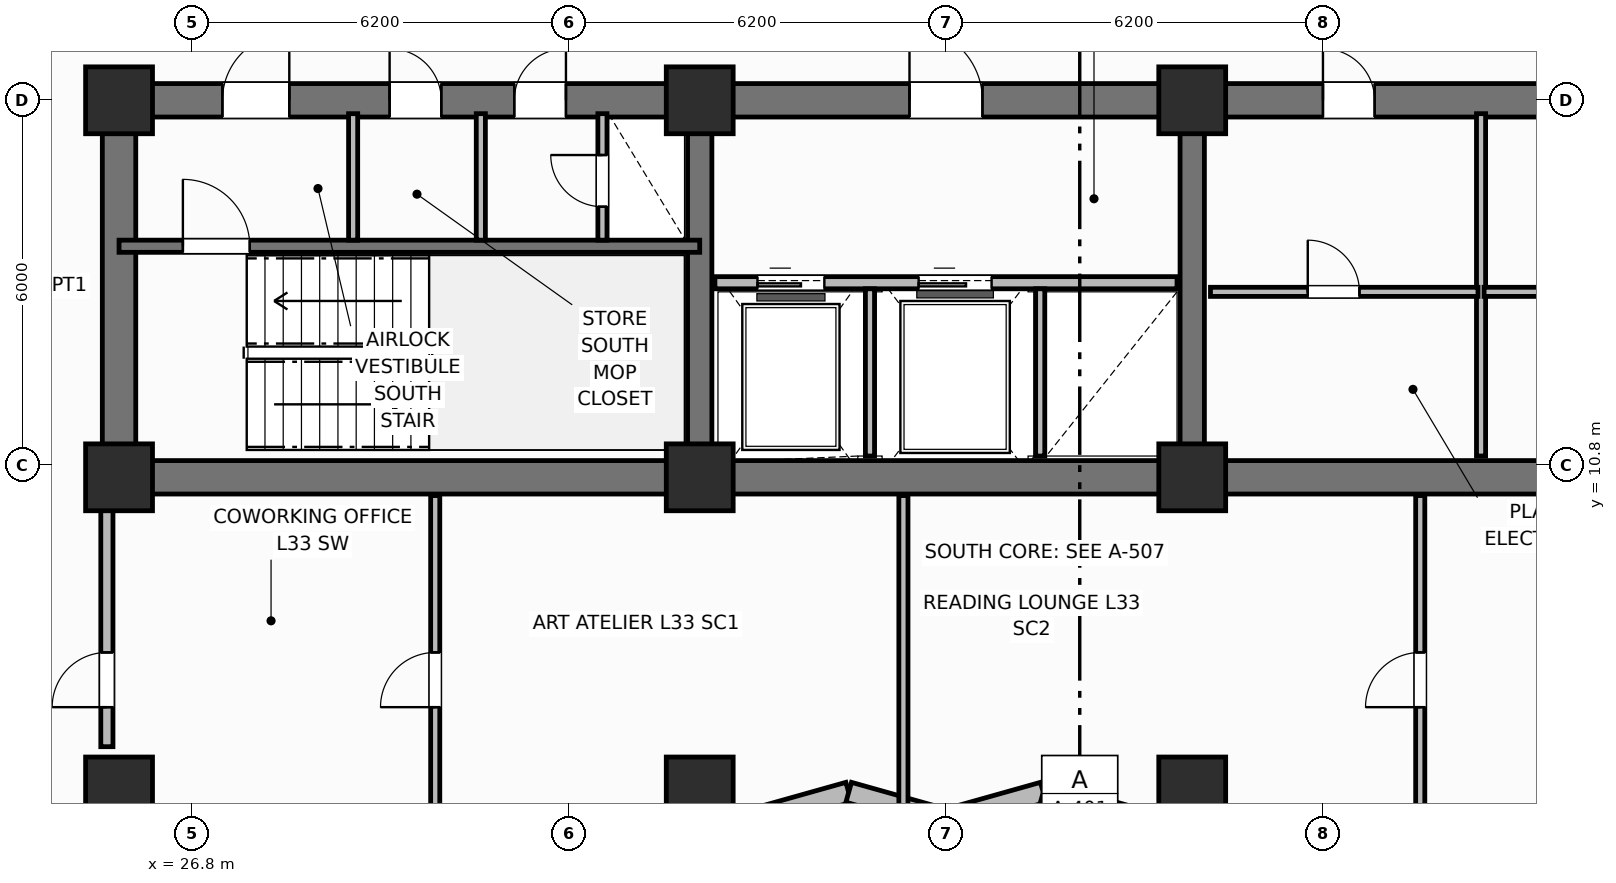
"""IFC4 building model, lengths in metres.
Left out: names, types, materials, properties, quantities, classifications, styles, units other than length and angle.
Written with IfcOpenShell. Run it as: python <this file> out.ifc"""

import sys

from ifc_helpers import new_model, si_unit, direction, frame, frame_2d, origin, origin_2d, place, context, subcontext, project, spatial, rectangle, extrude, element, fill, save


model = new_model("IFC4")
c1 = context("Model", 3, precision=1e-05, world=origin(), true_north=direction((0.0, 1.0)))
c2 = subcontext(c1, "Body", "Model", "MODEL_VIEW")
j1 = project(units=[si_unit("LENGTHUNIT", "METRE"), si_unit("PLANEANGLEUNIT", "RADIAN")], contexts=[c1])
p1 = place(None, origin())
s1 = spatial("IfcSite", under=j1, at=p1, CompositionType="ELEMENT")
p2 = place(p1, origin())
s2 = spatial("IfcBuilding", under=s1, at=p2, CompositionType="ELEMENT")
p3 = place(p2, frame((0.0, 0.0, 132.7)))
s3 = spatial("IfcBuildingStorey", under=s2, at=p3, CompositionType="ELEMENT", Elevation=132.7)
p4 = place(p3, frame((52.8, 10.6, 0.0), z_axis=(0.0, 0.0, 1.0), x_axis=(-1.0, 0.0, 0.0)))
e1 = element("IfcWall", 1, at=p4, inside=s3, PredefinedType="SHEAR", context=c2, shape_type="SweptSolid", body=[
    extrude(rectangle(XDim=27.2, YDim=0.55, at=frame_2d((13.6, 0.0))), origin(), (0.0, 0.0, 1.0), 3.7),
])
p5 = place(p3, frame((25.6, 10.875, 0.0), z_axis=(0.0, 0.0, 1.0), x_axis=(0.0, 1.0, 0.0)))
e2 = element("IfcWall", 2, at=p5, inside=s3, PredefinedType="SHEAR", context=c2, shape_type="SweptSolid", body=[
    extrude(rectangle(XDim=5.65, YDim=0.55, at=frame_2d((2.825, 0.0))), origin(), (0.0, 0.0, 1.0), 3.7),
])
p6 = place(p3, frame((25.6, 16.8, 0.0), z_axis=(0.0, 0.0, 1.0), x_axis=(1.0, 0.0, 0.0)))
e3 = element("IfcWall", 3, at=p6, inside=s3, PredefinedType="SHEAR", context=c2, shape_type="SweptSolid", body=[
    extrude(rectangle(XDim=27.2, YDim=0.55, at=frame_2d((13.6, 0.0))), origin(), (0.0, 0.0, 1.0), 3.7),
])
p7 = place(p6, frame((1.7, 0.0, 0.0)))
e4 = element("IfcOpeningElement", 4, at=p7, cuts=e3, PredefinedType="OPENING", context=c2, shape_type="SweptSolid", body=[
    extrude(rectangle(XDim=1.1, YDim=2.15, at=frame_2d((0.55, 1.075))), frame((0.0, 0.285, 0.0), z_axis=(0.0, -1.0, 0.0), x_axis=(1.0, 0.0, 0.0)), (0.0, 0.0, 1.0), 0.57),
])
p8 = place(p6, frame((4.45, 0.0, 0.0)))
e5 = element("IfcOpeningElement", 5, at=p8, cuts=e3, PredefinedType="OPENING", context=c2, shape_type="SweptSolid", body=[
    extrude(rectangle(XDim=0.85, YDim=2.1, at=frame_2d((0.425, 1.05))), frame((0.0, 0.285, 0.0), z_axis=(0.0, -1.0, 0.0), x_axis=(1.0, 0.0, 0.0)), (0.0, 0.0, 1.0), 0.57),
])
p9 = place(p6, frame((6.5, 0.0, 0.0)))
e6 = element("IfcOpeningElement", 6, at=p9, cuts=e3, PredefinedType="OPENING", context=c2, shape_type="SweptSolid", body=[
    extrude(rectangle(XDim=0.85, YDim=2.1, at=frame_2d((0.425, 1.05))), frame((0.0, 0.285, 0.0), z_axis=(0.0, -1.0, 0.0), x_axis=(1.0, 0.0, 0.0)), (0.0, 0.0, 1.0), 0.57),
])
p10 = place(p6, frame((13.0, 0.0, 0.0)))
e7 = element("IfcOpeningElement", 7, at=p10, cuts=e3, PredefinedType="OPENING", context=c2, shape_type="SweptSolid", body=[
    extrude(rectangle(XDim=1.2, YDim=2.15, at=frame_2d((0.6, 1.075))), frame((0.0, 0.285, 0.0), z_axis=(0.0, -1.0, 0.0), x_axis=(1.0, 0.0, 0.0)), (0.0, 0.0, 1.0), 0.57),
])
p11 = place(p6, frame((19.8, 0.0, 0.0)))
e8 = element("IfcOpeningElement", 8, at=p11, cuts=e3, PredefinedType="OPENING", context=c2, shape_type="SweptSolid", body=[
    extrude(rectangle(XDim=0.85, YDim=2.1, at=frame_2d((0.425, 1.05))), frame((0.0, 0.285, 0.0), z_axis=(0.0, -1.0, 0.0), x_axis=(1.0, 0.0, 0.0)), (0.0, 0.0, 1.0), 0.57),
])
p12 = place(p6, frame((24.2, 0.0, 0.0)))
e9 = element("IfcOpeningElement", 9, at=p12, cuts=e3, PredefinedType="OPENING", context=c2, shape_type="SweptSolid", body=[
    extrude(rectangle(XDim=0.85, YDim=2.1, at=frame_2d((0.425, 1.05))), frame((0.0, 0.285, 0.0), z_axis=(0.0, -1.0, 0.0), x_axis=(1.0, 0.0, 0.0)), (0.0, 0.0, 1.0), 0.57),
])
for number, where, z_axis, x_axis in (
    (10, (35.15, 10.875, 0.0), (0.0, 0.0, 1.0), (0.0, 1.0, 0.0)),
    (11, (43.25, 10.875, 0.0), (0.0, 0.0, 1.0), (0.0, 1.0, 0.0)),
):
    element("IfcWall", number, at=place(p3, frame(where, z_axis=z_axis, x_axis=x_axis)), inside=s3, PredefinedType="SHEAR", context=c2, shape_type="SweptSolid", body=[
        extrude(rectangle(XDim=5.65, YDim=0.4, at=frame_2d((2.825, 0.0))), origin(), (0.0, 0.0, 1.0), 3.7),
    ])
for number, where, z_axis, x_axis in (
    (12, (25.6, 10.6, 0.0), (0.0, 0.0, 1.0), (1.0, 0.0, 0.0)),
    (13, (25.6, 16.8, 0.0), (0.0, 0.0, 1.0), (1.0, 0.0, 0.0)),
    (14, (35.15, 10.6, 0.0), (0.0, 0.0, 1.0), (1.0, 0.0, 0.0)),
    (15, (35.15, 16.8, 0.0), (0.0, 0.0, 1.0), (1.0, 0.0, 0.0)),
    (16, (43.25, 10.6, 0.0), (0.0, 0.0, 1.0), (1.0, 0.0, 0.0)),
    (17, (43.25, 16.8, 0.0), (0.0, 0.0, 1.0), (1.0, 0.0, 0.0)),
    (18, (25.6, 5.45, 0.0), (0.0, 0.0, 1.0), (1.0, 0.0, 0.0)),
    (19, (35.15, 5.45, 0.0), (0.0, 0.0, 1.0), (1.0, 0.0, 0.0)),
    (20, (43.25, 5.45, 0.0), (0.0, 0.0, 1.0), (1.0, 0.0, 0.0)),
):
    element("IfcColumn", number, at=place(p3, frame(where, z_axis=z_axis, x_axis=x_axis)), inside=s3, PredefinedType="COLUMN", context=c2, shape_type="SweptSolid", body=[
        extrude(rectangle(XDim=1.1, YDim=1.1, at=origin_2d()), origin(), (0.0, 0.0, 1.0), 3.7),
    ])
p13 = place(p3, frame((36.0, 4.97, 0.0), z_axis=(0.0, 0.0, 1.0), x_axis=(0.962662902433, 0.270703040766, 0.0)))
e21 = element("IfcWall", 21, at=p13, inside=s3, PredefinedType="SOLIDWALL", context=c2, shape_type="SweptSolid", body=[
    extrude(rectangle(XDim=1.662, YDim=0.34, at=frame_2d((0.831, 0.0))), origin(), (0.0, 0.0, 1.0), 2.66),
])
p14 = place(p3, frame((37.6, 5.42, 0.0), z_axis=(0.0, 0.0, 1.0), x_axis=(0.962652136636, -0.270741322725, 0.0)))
e22 = element("IfcWall", 22, at=p14, inside=s3, PredefinedType="SOLIDWALL", context=c2, shape_type="SweptSolid", body=[
    extrude(rectangle(XDim=1.662, YDim=0.34, at=frame_2d((0.831, 0.0))), origin(), (0.0, 0.0, 1.0), 2.66),
])
p15 = place(p3, frame((39.2, 4.97, 0.0), z_axis=(0.0, 0.0, 1.0), x_axis=(0.962662902433, 0.270703040766, 0.0)))
e23 = element("IfcWall", 23, at=p15, inside=s3, PredefinedType="SOLIDWALL", context=c2, shape_type="SweptSolid", body=[
    extrude(rectangle(XDim=1.662, YDim=0.34, at=frame_2d((0.831, 0.0))), origin(), (0.0, 0.0, 1.0), 2.66),
])
p16 = place(p3, frame((40.8, 5.42, 0.0), z_axis=(0.0, 0.0, 1.0), x_axis=(0.962652136636, -0.270741322725, 0.0)))
e24 = element("IfcWall", 24, at=p16, inside=s3, PredefinedType="SOLIDWALL", context=c2, shape_type="SweptSolid", body=[
    extrude(rectangle(XDim=1.662, YDim=0.34, at=frame_2d((0.831, 0.0))), origin(), (0.0, 0.0, 1.0), 2.66),
])
p17 = place(p3, frame((25.6, 14.4, 0.0), z_axis=(0.0, 0.0, 1.0), x_axis=(1.0, 0.0, 0.0)))
e25 = element("IfcWall", 25, at=p17, inside=s3, PredefinedType="SHEAR", context=c2, shape_type="SweptSolid", body=[
    extrude(rectangle(XDim=9.55, YDim=0.2, at=frame_2d((4.775, 0.0))), origin(), (0.0, 0.0, 1.0), 3.7),
])
p18 = place(p17, frame((1.05, 0.0, 0.0)))
e26 = element("IfcOpeningElement", 26, at=p18, cuts=e25, PredefinedType="OPENING", context=c2, shape_type="SweptSolid", body=[
    extrude(rectangle(XDim=1.1, YDim=2.15, at=frame_2d((0.55, 1.075))), frame((0.0, 0.11, 0.0), z_axis=(0.0, -1.0, 0.0), x_axis=(1.0, 0.0, 0.0)), (0.0, 0.0, 1.0), 0.22),
])
for number, where, z_axis, x_axis in (
    (27, (29.45, 14.5, 0.0), (0.0, 0.0, 1.0), (0.0, 1.0, 0.0)),
    (28, (31.55, 14.5, 0.0), (0.0, 0.0, 1.0), (0.0, 1.0, 0.0)),
):
    element("IfcWall", number, at=place(p3, frame(where, z_axis=z_axis, x_axis=x_axis)), inside=s3, PredefinedType="PARTITIONING", context=c2, shape_type="SweptSolid", body=[
        extrude(rectangle(XDim=2.08, YDim=0.15, at=frame_2d((1.04, 0.0))), origin(), (0.0, 0.0, 1.0), 2.49),
    ])
p19 = place(p3, frame((33.55, 14.5, 0.0), z_axis=(0.0, 0.0, 1.0), x_axis=(0.0, 1.0, 0.0)))
e29 = element("IfcWall", 29, at=p19, inside=s3, PredefinedType="PARTITIONING", context=c2, shape_type="SweptSolid", body=[
    extrude(rectangle(XDim=2.08, YDim=0.15, at=frame_2d((1.04, 0.0))), origin(), (0.0, 0.0, 1.0), 2.49),
])
p20 = place(p19, frame((0.55, 0.0, 0.0)))
e30 = element("IfcOpeningElement", 30, at=p20, cuts=e29, PredefinedType="OPENING", context=c2, shape_type="SweptSolid", body=[
    extrude(rectangle(XDim=0.85, YDim=2.05, at=frame_2d((0.425, 1.025))), frame((0.0, 0.085, 0.0), z_axis=(0.0, -1.0, 0.0), x_axis=(1.0, 0.0, 0.0)), (0.0, 0.0, 1.0), 0.17),
])
p21 = place(p3, frame((35.4, 13.8, 0.0), z_axis=(0.0, 0.0, 1.0), x_axis=(1.0, 0.0, 0.0)))
e31 = element("IfcWall", 31, at=p21, inside=s3, PredefinedType="PARTITIONING", context=c2, shape_type="SweptSolid", body=[
    extrude(rectangle(XDim=7.6, YDim=0.2, at=frame_2d((3.8, 0.0))), origin(), (0.0, 0.0, 1.0), 2.26),
])
p22 = place(p21, frame((0.7, 0.0, 0.0)))
e32 = element("IfcOpeningElement", 32, at=p22, cuts=e31, PredefinedType="OPENING", context=c2, shape_type="SweptSolid", body=[
    extrude(rectangle(XDim=1.1, YDim=2.15, at=frame_2d((0.55, 1.075))), frame((0.0, 0.11, 0.0), z_axis=(0.0, -1.0, 0.0), x_axis=(1.0, 0.0, 0.0)), (0.0, 0.0, 1.0), 0.22),
])
p23 = place(p21, frame((3.35, 0.0, 0.0)))
e33 = element("IfcOpeningElement", 33, at=p23, cuts=e31, PredefinedType="OPENING", context=c2, shape_type="SweptSolid", body=[
    extrude(rectangle(XDim=1.2, YDim=2.15, at=frame_2d((0.6, 1.075))), frame((0.0, 0.11, 0.0), z_axis=(0.0, -1.0, 0.0), x_axis=(1.0, 0.0, 0.0)), (0.0, 0.0, 1.0), 0.22),
])
for number, where, z_axis, x_axis in (
    (34, (37.95, 10.95, 0.0), (0.0, 0.0, 1.0), (0.0, 1.0, 0.0)),
    (35, (40.75, 10.95, 0.0), (0.0, 0.0, 1.0), (0.0, 1.0, 0.0)),
):
    element("IfcWall", number, at=place(p3, frame(where, z_axis=z_axis, x_axis=x_axis)), inside=s3, PredefinedType="PARTITIONING", context=c2, shape_type="SweptSolid", body=[
        extrude(rectangle(XDim=2.75, YDim=0.15, at=frame_2d((1.375, 0.0))), origin(), (0.0, 0.0, 1.0), 2.49),
    ])
p24 = place(p3, frame((48.0, 10.95, 0.0), z_axis=(0.0, 0.0, 1.0), x_axis=(0.0, 1.0, 0.0)))
e36 = element("IfcWall", 36, at=p24, inside=s3, PredefinedType="PARTITIONING", context=c2, shape_type="SweptSolid", body=[
    extrude(rectangle(XDim=5.63, YDim=0.15, at=frame_2d((2.815, 0.0))), origin(), (0.0, 0.0, 1.0), 2.49),
])
p25 = place(p3, frame((43.55, 13.65, 0.0), z_axis=(0.0, 0.0, 1.0), x_axis=(1.0, 0.0, 0.0)))
e37 = element("IfcWall", 37, at=p25, inside=s3, PredefinedType="PARTITIONING", context=c2, shape_type="SweptSolid", body=[
    extrude(rectangle(XDim=4.4, YDim=0.15, at=frame_2d((2.2, 0.0))), origin(), (0.0, 0.0, 1.0), 2.49),
])
p26 = place(p25, frame((1.6, 0.0, 0.0)))
e38 = element("IfcOpeningElement", 38, at=p26, cuts=e37, PredefinedType="OPENING", context=c2, shape_type="SweptSolid", body=[
    extrude(rectangle(XDim=0.85, YDim=2.1, at=frame_2d((0.425, 1.05))), frame((0.0, 0.085, 0.0), z_axis=(0.0, -1.0, 0.0), x_axis=(1.0, 0.0, 0.0)), (0.0, 0.0, 1.0), 0.17),
])
p27 = place(p3, frame((48.05, 13.65, 0.0), z_axis=(0.0, 0.0, 1.0), x_axis=(1.0, 0.0, 0.0)))
e39 = element("IfcWall", 39, at=p27, inside=s3, PredefinedType="PARTITIONING", context=c2, shape_type="SweptSolid", body=[
    extrude(rectangle(XDim=4.4, YDim=0.15, at=frame_2d((2.2, 0.0))), origin(), (0.0, 0.0, 1.0), 2.49),
])
p28 = place(p27, frame((1.6, 0.0, 0.0)))
e40 = element("IfcOpeningElement", 40, at=p28, cuts=e39, PredefinedType="OPENING", context=c2, shape_type="SweptSolid", body=[
    extrude(rectangle(XDim=0.85, YDim=2.1, at=frame_2d((0.425, 1.05))), frame((0.0, 0.085, 0.0), z_axis=(0.0, -1.0, 0.0), x_axis=(1.0, 0.0, 0.0)), (0.0, 0.0, 1.0), 0.17),
])
p29 = place(p3, frame((30.8, 4.97, 0.0), z_axis=(0.0, 0.0, 1.0), x_axis=(0.0, 1.0, 0.0)))
e41 = element("IfcWall", 41, at=p29, inside=s3, PredefinedType="PARTITIONING", context=c2, shape_type="SweptSolid", body=[
    extrude(rectangle(XDim=5.33, YDim=0.15, at=frame_2d((2.665, 0.0))), origin(), (0.0, 0.0, 1.0), 2.49),
])
p30 = place(p29, frame((1.85, 0.0, 0.0)))
e42 = element("IfcOpeningElement", 42, at=p30, cuts=e41, PredefinedType="OPENING", context=c2, shape_type="SweptSolid", body=[
    extrude(rectangle(XDim=0.9, YDim=2.1, at=frame_2d((0.45, 1.05))), frame((0.0, 0.085, 0.0), z_axis=(0.0, -1.0, 0.0), x_axis=(1.0, 0.0, 0.0)), (0.0, 0.0, 1.0), 0.17),
])
p31 = place(p3, frame((38.5, 4.97, 0.0), z_axis=(0.0, 0.0, 1.0), x_axis=(0.0, 1.0, 0.0)))
e43 = element("IfcWall", 43, at=p31, inside=s3, PredefinedType="PARTITIONING", context=c2, shape_type="SweptSolid", body=[
    extrude(rectangle(XDim=5.33, YDim=0.15, at=frame_2d((2.665, 0.0))), origin(), (0.0, 0.0, 1.0), 2.49),
])
p32 = place(p3, frame((47.0, 4.97, 0.0), z_axis=(0.0, 0.0, 1.0), x_axis=(0.0, 1.0, 0.0)))
e44 = element("IfcWall", 44, at=p32, inside=s3, PredefinedType="PARTITIONING", context=c2, shape_type="SweptSolid", body=[
    extrude(rectangle(XDim=5.33, YDim=0.15, at=frame_2d((2.665, 0.0))), origin(), (0.0, 0.0, 1.0), 2.49),
])
p33 = place(p32, frame((1.85, 0.0, 0.0)))
e45 = element("IfcOpeningElement", 45, at=p33, cuts=e44, PredefinedType="OPENING", context=c2, shape_type="SweptSolid", body=[
    extrude(rectangle(XDim=0.9, YDim=2.1, at=frame_2d((0.45, 1.05))), frame((0.0, 0.085, 0.0), z_axis=(0.0, -1.0, 0.0), x_axis=(1.0, 0.0, 0.0)), (0.0, 0.0, 1.0), 0.17),
])
p34 = place(p3, frame((25.4, 6.17, 0.0), z_axis=(0.0, 0.0, 1.0), x_axis=(0.0, 1.0, 0.0)))
e46 = element("IfcWall", 46, at=p34, inside=s3, PredefinedType="PARTITIONING", context=c2, shape_type="SweptSolid", body=[
    extrude(rectangle(XDim=4.13, YDim=0.2, at=frame_2d((2.065, 0.0))), origin(), (0.0, 0.0, 1.0), 2.49),
])
p35 = place(p34, frame((0.65, 0.0, 0.0)))
e47 = element("IfcOpeningElement", 47, at=p35, cuts=e46, PredefinedType="OPENING", context=c2, shape_type="SweptSolid", body=[
    extrude(rectangle(XDim=0.9, YDim=2.1, at=frame_2d((0.45, 1.05))), frame((0.0, 0.11, 0.0), z_axis=(0.0, -1.0, 0.0), x_axis=(1.0, 0.0, 0.0)), (0.0, 0.0, 1.0), 0.22),
])
p36 = place(p18, origin())
e48 = element("IfcDoor", 48, at=p36, inside=s3, OperationType="SINGLE_SWING_LEFT", PredefinedType="DOOR", context=c2, shape_type="SweptSolid", body=[
    extrude(rectangle(XDim=1.1, YDim=2.15, at=frame_2d((0.55, 1.075))), frame((0.0, 0.025, 0.0), z_axis=(0.0, -1.0, 0.0), x_axis=(1.0, 0.0, 0.0)), (0.0, 0.0, 1.0), 0.05),
])
fill(e26, e48)
p37 = place(p20, origin())
e49 = element("IfcDoor", 49, at=p37, inside=s3, OperationType="SINGLE_SWING_RIGHT", PredefinedType="TRAPDOOR", context=c2, shape_type="SweptSolid", body=[
    extrude(rectangle(XDim=0.85, YDim=2.05, at=frame_2d((0.425, 1.025))), frame((0.0, 0.025, 0.0), z_axis=(0.0, -1.0, 0.0), x_axis=(1.0, 0.0, 0.0)), (0.0, 0.0, 1.0), 0.05),
])
fill(e30, e49)
p38 = place(p22, origin())
e50 = element("IfcDoor", 50, at=p38, inside=s3, OperationType="SLIDING_TO_LEFT", PredefinedType="DOOR", context=c2, shape_type="SweptSolid", body=[
    extrude(rectangle(XDim=1.1, YDim=2.15, at=frame_2d((0.55, 1.075))), frame((0.0, 0.025, 0.0), z_axis=(0.0, -1.0, 0.0), x_axis=(1.0, 0.0, 0.0)), (0.0, 0.0, 1.0), 0.05),
])
fill(e32, e50)
p39 = place(p23, origin())
e51 = element("IfcDoor", 51, at=p39, inside=s3, OperationType="SLIDING_TO_LEFT", PredefinedType="DOOR", context=c2, shape_type="SweptSolid", body=[
    extrude(rectangle(XDim=1.2, YDim=2.15, at=frame_2d((0.6, 1.075))), frame((0.0, 0.025, 0.0), z_axis=(0.0, -1.0, 0.0), x_axis=(1.0, 0.0, 0.0)), (0.0, 0.0, 1.0), 0.05),
])
fill(e33, e51)
p40 = place(p26, origin())
e52 = element("IfcDoor", 52, at=p40, inside=s3, OperationType="SINGLE_SWING_LEFT", PredefinedType="DOOR", context=c2, shape_type="SweptSolid", body=[
    extrude(rectangle(XDim=0.85, YDim=2.1, at=frame_2d((0.425, 1.05))), frame((0.0, 0.025, 0.0), z_axis=(0.0, -1.0, 0.0), x_axis=(1.0, 0.0, 0.0)), (0.0, 0.0, 1.0), 0.05),
])
fill(e38, e52)
p41 = place(p30, origin())
e53 = element("IfcDoor", 53, at=p41, inside=s3, OperationType="SINGLE_SWING_LEFT", PredefinedType="DOOR", context=c2, shape_type="SweptSolid", body=[
    extrude(rectangle(XDim=0.9, YDim=2.1, at=frame_2d((0.45, 1.05))), frame((0.0, 0.025, 0.0), z_axis=(0.0, -1.0, 0.0), x_axis=(1.0, 0.0, 0.0)), (0.0, 0.0, 1.0), 0.05),
])
fill(e42, e53)
p42 = place(p33, origin())
e54 = element("IfcDoor", 54, at=p42, inside=s3, OperationType="SINGLE_SWING_LEFT", PredefinedType="DOOR", context=c2, shape_type="SweptSolid", body=[
    extrude(rectangle(XDim=0.9, YDim=2.1, at=frame_2d((0.45, 1.05))), frame((0.0, 0.025, 0.0), z_axis=(0.0, -1.0, 0.0), x_axis=(1.0, 0.0, 0.0)), (0.0, 0.0, 1.0), 0.05),
])
fill(e45, e54)
p43 = place(p35, origin())
e55 = element("IfcDoor", 55, at=p43, inside=s3, OperationType="SINGLE_SWING_LEFT", PredefinedType="DOOR", context=c2, shape_type="SweptSolid", body=[
    extrude(rectangle(XDim=0.9, YDim=2.1, at=frame_2d((0.45, 1.05))), frame((0.0, 0.025, 0.0), z_axis=(0.0, -1.0, 0.0), x_axis=(1.0, 0.0, 0.0)), (0.0, 0.0, 1.0), 0.05),
])
fill(e47, e55)
p44 = place(p7, origin())
e56 = element("IfcDoor", 56, at=p44, inside=s3, OperationType="SINGLE_SWING_RIGHT", PredefinedType="DOOR", context=c2, shape_type="SweptSolid", body=[
    extrude(rectangle(XDim=1.1, YDim=2.15, at=frame_2d((0.55, 1.075))), frame((0.0, 0.025, 0.0), z_axis=(0.0, -1.0, 0.0), x_axis=(1.0, 0.0, 0.0)), (0.0, 0.0, 1.0), 0.05),
])
fill(e4, e56)
p45 = place(p8, origin())
e57 = element("IfcDoor", 57, at=p45, inside=s3, OperationType="SINGLE_SWING_LEFT", PredefinedType="DOOR", context=c2, shape_type="SweptSolid", body=[
    extrude(rectangle(XDim=0.85, YDim=2.1, at=frame_2d((0.425, 1.05))), frame((0.0, 0.025, 0.0), z_axis=(0.0, -1.0, 0.0), x_axis=(1.0, 0.0, 0.0)), (0.0, 0.0, 1.0), 0.05),
])
fill(e5, e57)
p46 = place(p9, origin())
e58 = element("IfcDoor", 58, at=p46, inside=s3, OperationType="SINGLE_SWING_RIGHT", PredefinedType="DOOR", context=c2, shape_type="SweptSolid", body=[
    extrude(rectangle(XDim=0.85, YDim=2.1, at=frame_2d((0.425, 1.05))), frame((0.0, 0.025, 0.0), z_axis=(0.0, -1.0, 0.0), x_axis=(1.0, 0.0, 0.0)), (0.0, 0.0, 1.0), 0.05),
])
fill(e6, e58)
p47 = place(p10, origin())
e59 = element("IfcDoor", 59, at=p47, inside=s3, OperationType="SINGLE_SWING_LEFT", PredefinedType="DOOR", context=c2, shape_type="SweptSolid", body=[
    extrude(rectangle(XDim=1.2, YDim=2.15, at=frame_2d((0.6, 1.075))), frame((0.0, 0.025, 0.0), z_axis=(0.0, -1.0, 0.0), x_axis=(1.0, 0.0, 0.0)), (0.0, 0.0, 1.0), 0.05),
])
fill(e7, e59)
p48 = place(p11, origin())
e60 = element("IfcDoor", 60, at=p48, inside=s3, OperationType="SINGLE_SWING_LEFT", PredefinedType="DOOR", context=c2, shape_type="SweptSolid", body=[
    extrude(rectangle(XDim=0.85, YDim=2.1, at=frame_2d((0.425, 1.05))), frame((0.0, 0.025, 0.0), z_axis=(0.0, -1.0, 0.0), x_axis=(1.0, 0.0, 0.0)), (0.0, 0.0, 1.0), 0.05),
])
fill(e8, e60)
save(model, sys.argv[1])
